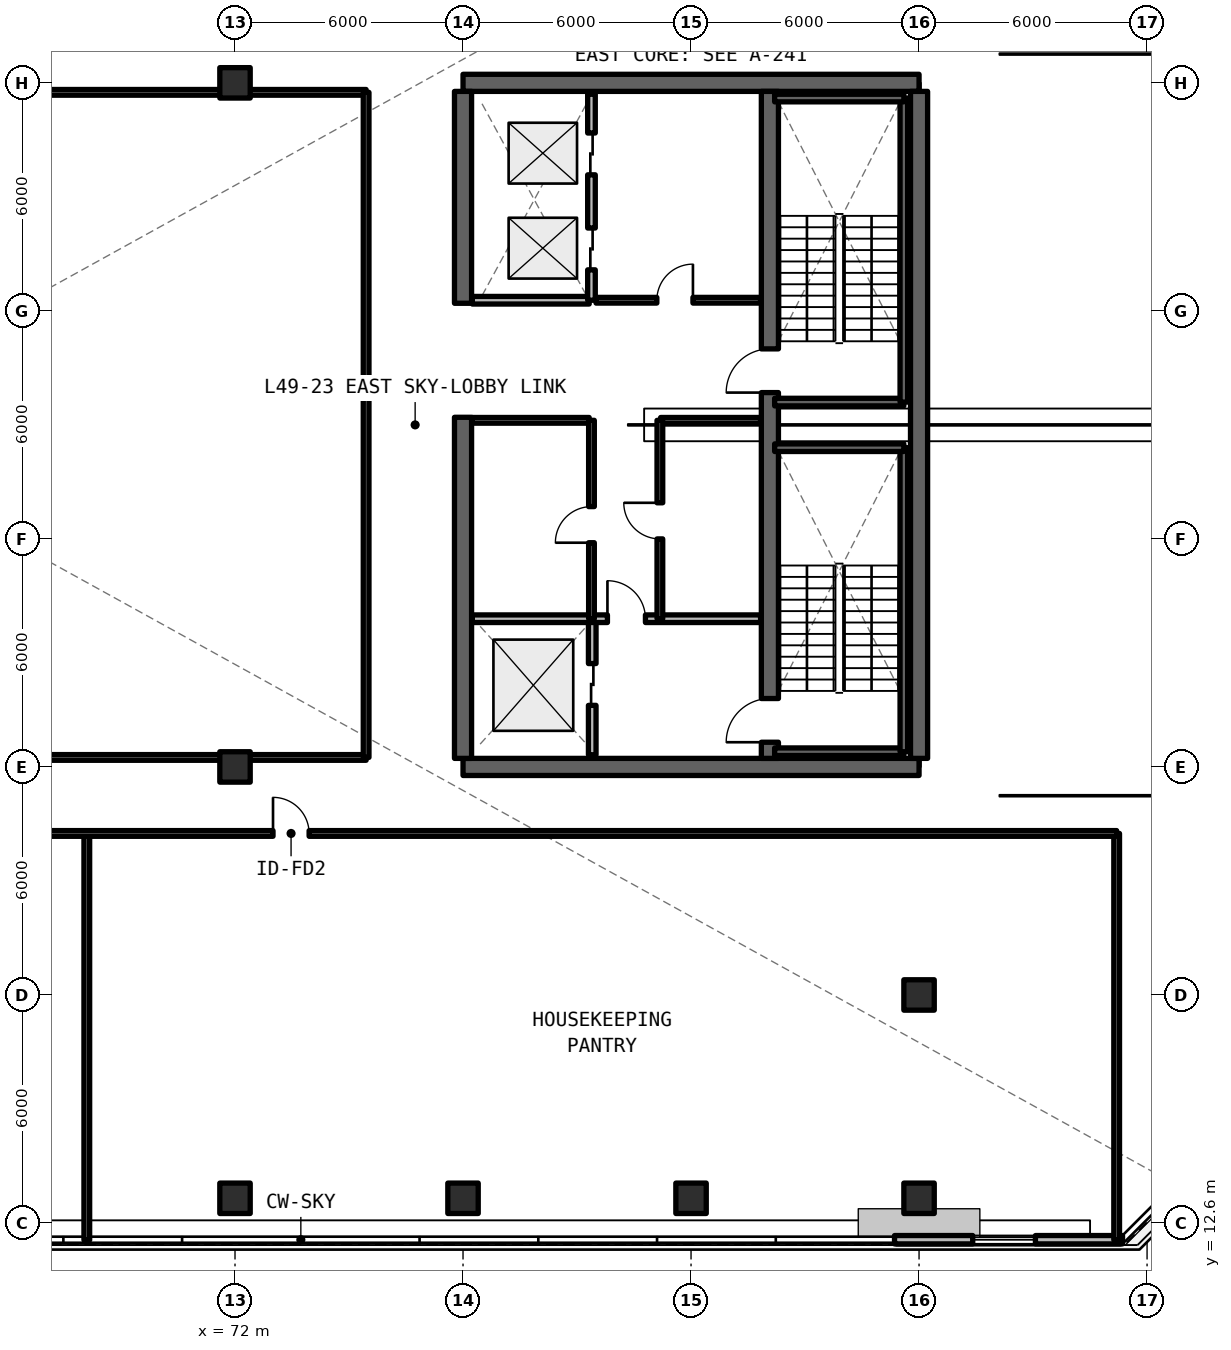
"""IFC4 building model, lengths in metres.
Left out: names, types, materials, properties, quantities, classifications, styles, units other than length and angle.
Written with IfcOpenShell. Run it as: python <this file> out.ifc"""

import sys

from ifc_helpers import new_model, si_unit, direction, frame, frame_2d, origin, origin_2d, place, context, subcontext, project, spatial, rectangle, extrude, element, fill, save


model = new_model("IFC4")
c1 = context("Model", 3, precision=1e-05, world=origin(), true_north=direction((0.0, 1.0)))
c2 = subcontext(c1, "Body", "Model", "MODEL_VIEW")
j1 = project(units=[si_unit("LENGTHUNIT", "METRE"), si_unit("PLANEANGLEUNIT", "RADIAN")], contexts=[c1])
p1 = place(None, origin())
s1 = spatial("IfcSite", under=j1, at=p1, CompositionType="ELEMENT")
p2 = place(p1, origin())
s2 = spatial("IfcBuilding", under=s1, at=p2, CompositionType="ELEMENT")
p3 = place(p2, frame((0.0, 0.0, 177.87)))
s3 = spatial("IfcBuildingStorey", under=s2, at=p3, CompositionType="ELEMENT", Elevation=177.87)
for number, where, z_axis, x_axis in (
    (1, (78.0, 24.6, 0.0), (0.0, 0.0, 1.0), (1.0, 0.0, 0.0)),
    (2, (90.0, 42.6, 0.0), (0.0, 0.0, 1.0), (-1.0, 0.0, 0.0)),
):
    element("IfcWall", number, at=place(p3, frame(where, z_axis=z_axis, x_axis=x_axis)), inside=s3, PredefinedType="SHEAR", context=c2, shape_type="SweptSolid", body=[
        extrude(rectangle(XDim=12.0, YDim=0.45, at=frame_2d((6.0, 0.0))), origin(), (0.0, 0.0, 1.0), 3.96),
    ])
p4 = place(p3, frame((90.0, 24.825, 0.0), z_axis=(0.0, 0.0, 1.0), x_axis=(0.0, 1.0, 0.0)))
e3 = element("IfcWall", 3, at=p4, inside=s3, PredefinedType="SHEAR", context=c2, shape_type="SweptSolid", body=[
    extrude(rectangle(XDim=17.55, YDim=0.45, at=frame_2d((8.775, 0.0))), origin(), (0.0, 0.0, 1.0), 3.96),
])
p5 = place(p3, frame((78.0, 24.825, 0.0), z_axis=(0.0, 0.0, 1.0), x_axis=(0.0, 1.0, 0.0)))
e4 = element("IfcWall", 4, at=p5, inside=s3, PredefinedType="SHEAR", context=c2, shape_type="SweptSolid", body=[
    extrude(rectangle(XDim=8.975, YDim=0.45, at=frame_2d((4.488, 0.0))), origin(), (0.0, 0.0, 1.0), 3.96),
])
p6 = place(p3, frame((78.0, 36.8, 0.0), z_axis=(0.0, 0.0, 1.0), x_axis=(0.0, 1.0, 0.0)))
e5 = element("IfcWall", 5, at=p6, inside=s3, PredefinedType="SHEAR", context=c2, shape_type="SweptSolid", body=[
    extrude(rectangle(XDim=5.575, YDim=0.45, at=frame_2d((2.788, 0.0))), origin(), (0.0, 0.0, 1.0), 3.96),
])
p7 = place(p3, frame((86.075, 24.825, 0.0), z_axis=(0.0, 0.0, 1.0), x_axis=(0.0, 1.0, 0.0)))
e6 = element("IfcWall", 6, at=p7, inside=s3, PredefinedType="SHEAR", context=c2, shape_type="SweptSolid", body=[
    extrude(rectangle(XDim=17.55, YDim=0.45, at=frame_2d((8.775, 0.0))), origin(), (0.0, 0.0, 1.0), 3.96),
])
p8 = place(p7, frame((0.425, 0.0, 0.0)))
e7 = element("IfcOpeningElement", 7, at=p8, cuts=e6, PredefinedType="OPENING", context=c2, shape_type="SweptSolid", body=[
    extrude(rectangle(XDim=1.15, YDim=2.15, at=frame_2d((0.575, 1.075))), frame((0.0, 0.235, 0.0), z_axis=(0.0, -1.0, 0.0), x_axis=(1.0, 0.0, 0.0)), (0.0, 0.0, 1.0), 0.47),
])
p9 = place(p7, frame((9.625, 0.0, 0.0)))
e8 = element("IfcOpeningElement", 8, at=p9, cuts=e6, PredefinedType="OPENING", context=c2, shape_type="SweptSolid", body=[
    extrude(rectangle(XDim=1.15, YDim=2.15, at=frame_2d((0.575, 1.075))), frame((0.0, 0.235, 0.0), z_axis=(0.0, -1.0, 0.0), x_axis=(1.0, 0.0, 0.0)), (0.0, 0.0, 1.0), 0.47),
])
for number, where, z_axis, x_axis in (
    (9, (72.0, 24.6, 0.0), (0.0, 0.0, 1.0), (1.0, 0.0, 0.0)),
    (10, (72.0, 42.6, 0.0), (0.0, 0.0, 1.0), (1.0, 0.0, 0.0)),
    (11, (90.0, 18.6, 0.0), (0.0, 0.0, 1.0), (1.0, 0.0, 0.0)),
):
    element("IfcColumn", number, at=place(p3, frame(where, z_axis=z_axis, x_axis=x_axis)), inside=s3, PredefinedType="COLUMN", context=c2, shape_type="SweptSolid", body=[
        extrude(rectangle(XDim=0.8, YDim=0.8, at=origin_2d()), origin(), (0.0, 0.0, 1.0), 3.96),
    ])
for number, where, z_axis, x_axis in (
    (12, (72.0, 13.25, -0.28), (0.0, 0.0, 1.0), (1.0, 0.0, 0.0)),
    (13, (78.0, 13.25, -0.28), (0.0, 0.0, 1.0), (1.0, 0.0, 0.0)),
    (14, (84.0, 13.25, -0.28), (0.0, 0.0, 1.0), (1.0, 0.0, 0.0)),
    (15, (90.0, 13.25, -0.28), (0.0, 0.0, 1.0), (1.0, 0.0, 0.0)),
):
    element("IfcColumn", number, at=place(p3, frame(where, z_axis=z_axis, x_axis=x_axis)), inside=s3, PredefinedType="COLUMN", context=c2, shape_type="SweptSolid", body=[
        extrude(rectangle(XDim=0.8, YDim=0.8, at=origin_2d()), origin(), (0.0, 0.0, 1.0), 4.24),
    ])
p10 = place(p3, frame((89.354, 12.16, 0.0), z_axis=(0.0, 0.0, 1.0), x_axis=(1.0, 0.0, 0.0)))
e16 = element("IfcWall", 16, at=p10, inside=s3, PredefinedType="SOLIDWALL", context=c2, shape_type="SweptSolid", body=[
    extrude(rectangle(XDim=6.0, YDim=0.22, at=frame_2d((3.0, 0.0))), origin(), (0.0, 0.0, 1.0), 3.74),
])
p11 = place(p10, frame((2.058, 0.0, 0.78)))
e17 = element("IfcOpeningElement", 17, at=p11, cuts=e16, PredefinedType="OPENING", context=c2, shape_type="SweptSolid", body=[
    extrude(rectangle(XDim=1.65, YDim=1.66, at=frame_2d((0.825, 0.83))), frame((0.0, 0.12, 0.0), z_axis=(0.0, -1.0, 0.0), x_axis=(1.0, 0.0, 0.0)), (0.0, 0.0, 1.0), 0.24),
])
p12 = place(p3, frame((81.4, 24.92, 0.0), z_axis=(0.0, 0.0, 1.0), x_axis=(0.0, 1.0, 0.0)))
e18 = element("IfcWall", 18, at=p12, inside=s3, PredefinedType="SOLIDWALL", context=c2, shape_type="SweptSolid", body=[
    extrude(rectangle(XDim=3.58, YDim=0.2, at=frame_2d((1.79, 0.0))), origin(), (0.0, 0.0, 1.0), 2.96),
])
p13 = place(p12, frame((1.3, 0.0, 0.0)))
e19 = element("IfcOpeningElement", 19, at=p13, cuts=e18, PredefinedType="OPENING", context=c2, shape_type="SweptSolid", body=[
    extrude(rectangle(XDim=1.1, YDim=2.2, at=frame_2d((0.55, 1.1))), frame((0.0, 0.11, 0.0), z_axis=(0.0, -1.0, 0.0), x_axis=(1.0, 0.0, 0.0)), (0.0, 0.0, 1.0), 0.22),
])
p14 = place(p3, frame((78.245, 28.5, 0.0), z_axis=(0.0, 0.0, 1.0), x_axis=(1.0, 0.0, 0.0)))
e20 = element("IfcWall", 20, at=p14, inside=s3, PredefinedType="SOLIDWALL", context=c2, shape_type="SweptSolid", body=[
    extrude(rectangle(XDim=7.585, YDim=0.2, at=frame_2d((3.792, 0.0))), origin(), (0.0, 0.0, 1.0), 2.96),
])
p15 = place(p14, frame((3.555, 0.0, 0.0)))
e21 = element("IfcOpeningElement", 21, at=p15, cuts=e20, PredefinedType="OPENING", context=c2, shape_type="SweptSolid", body=[
    extrude(rectangle(XDim=1.0, YDim=2.15, at=frame_2d((0.5, 1.075))), frame((0.0, 0.11, 0.0), z_axis=(0.0, -1.0, 0.0), x_axis=(1.0, 0.0, 0.0)), (0.0, 0.0, 1.0), 0.22),
])
p16 = place(p3, frame((83.2, 33.72, 0.0), z_axis=(0.0, 0.0, 1.0), x_axis=(1.0, 0.0, 0.0)))
e22 = element("IfcWall", 22, at=p16, inside=s3, PredefinedType="SOLIDWALL", context=c2, shape_type="SweptSolid", body=[
    extrude(rectangle(XDim=2.63, YDim=0.15, at=frame_2d((1.315, 0.0))), origin(), (0.0, 0.0, 1.0), 2.96),
])
p17 = place(p3, frame((83.18, 28.5, 0.0), z_axis=(0.0, 0.0, 1.0), x_axis=(0.0, 1.0, 0.0)))
e23 = element("IfcWall", 23, at=p17, inside=s3, PredefinedType="SOLIDWALL", context=c2, shape_type="SweptSolid", body=[
    extrude(rectangle(XDim=5.22, YDim=0.15, at=frame_2d((2.61, 0.0))), origin(), (0.0, 0.0, 1.0), 2.96),
])
p18 = place(p17, frame((2.1, 0.0, 0.0)))
e24 = element("IfcOpeningElement", 24, at=p18, cuts=e23, PredefinedType="OPENING", context=c2, shape_type="SweptSolid", body=[
    extrude(rectangle(XDim=0.95, YDim=2.15, at=frame_2d((0.475, 1.075))), frame((0.0, 0.085, 0.0), z_axis=(0.0, -1.0, 0.0), x_axis=(1.0, 0.0, 0.0)), (0.0, 0.0, 1.0), 0.17),
])
p19 = place(p3, frame((78.245, 33.72, 0.0), z_axis=(0.0, 0.0, 1.0), x_axis=(1.0, 0.0, 0.0)))
e25 = element("IfcWall", 25, at=p19, inside=s3, PredefinedType="SOLIDWALL", context=c2, shape_type="SweptSolid", body=[
    extrude(rectangle(XDim=3.075, YDim=0.15, at=frame_2d((1.538, 0.0))), origin(), (0.0, 0.0, 1.0), 2.96),
])
p20 = place(p3, frame((81.38, 28.5, 0.0), z_axis=(0.0, 0.0, 1.0), x_axis=(0.0, 1.0, 0.0)))
e26 = element("IfcWall", 26, at=p20, inside=s3, PredefinedType="SOLIDWALL", context=c2, shape_type="SweptSolid", body=[
    extrude(rectangle(XDim=5.22, YDim=0.15, at=frame_2d((2.61, 0.0))), origin(), (0.0, 0.0, 1.0), 2.96),
])
p21 = place(p20, frame((2.0, 0.0, 0.0)))
e27 = element("IfcOpeningElement", 27, at=p21, cuts=e26, PredefinedType="OPENING", context=c2, shape_type="SweptSolid", body=[
    extrude(rectangle(XDim=0.95, YDim=2.15, at=frame_2d((0.475, 1.075))), frame((0.0, 0.085, 0.0), z_axis=(0.0, -1.0, 0.0), x_axis=(1.0, 0.0, 0.0)), (0.0, 0.0, 1.0), 0.17),
])
p22 = place(p3, frame((81.5, 36.88, 0.0), z_axis=(0.0, 0.0, 1.0), x_axis=(1.0, 0.0, 0.0)))
e28 = element("IfcWall", 28, at=p22, inside=s3, PredefinedType="SOLIDWALL", context=c2, shape_type="SweptSolid", body=[
    extrude(rectangle(XDim=4.33, YDim=0.15, at=frame_2d((2.165, 0.0))), origin(), (0.0, 0.0, 1.0), 2.96),
])
p23 = place(p22, frame((1.6, 0.0, 0.0)))
e29 = element("IfcOpeningElement", 29, at=p23, cuts=e28, PredefinedType="OPENING", context=c2, shape_type="SweptSolid", body=[
    extrude(rectangle(XDim=0.95, YDim=2.15, at=frame_2d((0.475, 1.075))), frame((0.0, 0.085, 0.0), z_axis=(0.0, -1.0, 0.0), x_axis=(1.0, 0.0, 0.0)), (0.0, 0.0, 1.0), 0.17),
])
p24 = place(p3, frame((78.245, 36.88, 0.0), z_axis=(0.0, 0.0, 1.0), x_axis=(1.0, 0.0, 0.0)))
e30 = element("IfcWall", 30, at=p24, inside=s3, PredefinedType="SOLIDWALL", context=c2, shape_type="SweptSolid", body=[
    extrude(rectangle(XDim=3.075, YDim=0.2, at=frame_2d((1.538, 0.0))), origin(), (0.0, 0.0, 1.0), 2.96),
])
p25 = place(p3, frame((81.38, 36.88, 0.0), z_axis=(0.0, 0.0, 1.0), x_axis=(0.0, 1.0, 0.0)))
e31 = element("IfcWall", 31, at=p25, inside=s3, PredefinedType="SOLIDWALL", context=c2, shape_type="SweptSolid", body=[
    extrude(rectangle(XDim=5.42, YDim=0.2, at=frame_2d((2.71, 0.0))), origin(), (0.0, 0.0, 1.0), 2.96),
])
p26 = place(p25, frame((0.8, 0.0, 0.0)))
e32 = element("IfcOpeningElement", 32, at=p26, cuts=e31, PredefinedType="OPENING", context=c2, shape_type="SweptSolid", body=[
    extrude(rectangle(XDim=1.1, YDim=2.2, at=frame_2d((0.55, 1.1))), frame((0.0, 0.11, 0.0), z_axis=(0.0, -1.0, 0.0), x_axis=(1.0, 0.0, 0.0)), (0.0, 0.0, 1.0), 0.22),
])
p27 = place(p25, frame((3.3, 0.0, 0.0)))
e33 = element("IfcOpeningElement", 33, at=p27, cuts=e31, PredefinedType="OPENING", context=c2, shape_type="SweptSolid", body=[
    extrude(rectangle(XDim=1.1, YDim=2.2, at=frame_2d((0.55, 1.1))), frame((0.0, 0.11, 0.0), z_axis=(0.0, -1.0, 0.0), x_axis=(1.0, 0.0, 0.0)), (0.0, 0.0, 1.0), 0.22),
])
for number, where, z_axis, x_axis in (
    (34, (38.55, 24.85, 0.0), (0.0, 0.0, 1.0), (1.0, 0.0, 0.0)),
    (35, (38.55, 42.35, 0.0), (0.0, 0.0, 1.0), (1.0, 0.0, 0.0)),
):
    element("IfcWall", number, at=place(p3, frame(where, z_axis=z_axis, x_axis=x_axis)), inside=s3, PredefinedType="SOLIDWALL", context=c2, shape_type="SweptSolid", body=[
        extrude(rectangle(XDim=36.9, YDim=0.15, at=frame_2d((18.45, 0.0))), origin(), (0.0, 0.0, 1.0), 2.96),
    ])
p28 = place(p3, frame((75.45, 24.85, 0.0), z_axis=(0.0, 0.0, 1.0), x_axis=(0.0, 1.0, 0.0)))
e36 = element("IfcWall", 36, at=p28, inside=s3, PredefinedType="SOLIDWALL", context=c2, shape_type="SweptSolid", body=[
    extrude(rectangle(XDim=17.5, YDim=0.15, at=frame_2d((8.75, 0.0))), origin(), (0.0, 0.0, 1.0), 2.96),
])
p29 = place(p3, frame((68.1, 12.15, 0.0), z_axis=(0.0, 0.0, 1.0), x_axis=(0.0, 1.0, 0.0)))
e37 = element("IfcWall", 37, at=p29, inside=s3, PredefinedType="PARTITIONING", context=c2, shape_type="SweptSolid", body=[
    extrude(rectangle(XDim=10.7, YDim=0.15, at=frame_2d((5.35, 0.0))), origin(), (0.0, 0.0, 1.0), 2.96),
])
p30 = place(p3, frame((95.2, 12.15, 0.0), z_axis=(0.0, 0.0, 1.0), x_axis=(0.0, 1.0, 0.0)))
e38 = element("IfcWall", 38, at=p30, inside=s3, PredefinedType="SOLIDWALL", context=c2, shape_type="SweptSolid", body=[
    extrude(rectangle(XDim=10.7, YDim=0.15, at=frame_2d((5.35, 0.0))), origin(), (0.0, 0.0, 1.0), 2.96),
])
p31 = place(p3, frame((26.0, 22.85, 0.0), z_axis=(0.0, 0.0, 1.0), x_axis=(1.0, 0.0, 0.0)))
e39 = element("IfcWall", 39, at=p31, inside=s3, PredefinedType="SOLIDWALL", context=c2, shape_type="SweptSolid", body=[
    extrude(rectangle(XDim=69.2, YDim=0.15, at=frame_2d((34.6, 0.0))), origin(), (0.0, 0.0, 1.0), 2.96),
])
p32 = place(p31, frame((6.0, 0.0, 0.0)))
e40 = element("IfcOpeningElement", 40, at=p32, cuts=e39, PredefinedType="OPENING", context=c2, shape_type="SweptSolid", body=[
    extrude(rectangle(XDim=1.4, YDim=2.15, at=frame_2d((0.7, 1.075))), frame((0.0, 0.085, 0.0), z_axis=(0.0, -1.0, 0.0), x_axis=(1.0, 0.0, 0.0)), (0.0, 0.0, 1.0), 0.17),
])
p33 = place(p31, frame((20.15, 0.0, 0.0)))
e41 = element("IfcOpeningElement", 41, at=p33, cuts=e39, PredefinedType="OPENING", context=c2, shape_type="SweptSolid", body=[
    extrude(rectangle(XDim=1.1, YDim=2.15, at=frame_2d((0.55, 1.075))), frame((0.0, 0.085, 0.0), z_axis=(0.0, -1.0, 0.0), x_axis=(1.0, 0.0, 0.0)), (0.0, 0.0, 1.0), 0.17),
])
p34 = place(p31, frame((30.5, 0.0, 0.0)))
e42 = element("IfcOpeningElement", 42, at=p34, cuts=e39, PredefinedType="OPENING", context=c2, shape_type="SweptSolid", body=[
    extrude(rectangle(XDim=1.4, YDim=2.15, at=frame_2d((0.7, 1.075))), frame((0.0, 0.085, 0.0), z_axis=(0.0, -1.0, 0.0), x_axis=(1.0, 0.0, 0.0)), (0.0, 0.0, 1.0), 0.17),
])
p35 = place(p31, frame((47.0, 0.0, 0.0)))
e43 = element("IfcOpeningElement", 43, at=p35, cuts=e39, PredefinedType="OPENING", context=c2, shape_type="SweptSolid", body=[
    extrude(rectangle(XDim=0.95, YDim=2.15, at=frame_2d((0.475, 1.075))), frame((0.0, 0.085, 0.0), z_axis=(0.0, -1.0, 0.0), x_axis=(1.0, 0.0, 0.0)), (0.0, 0.0, 1.0), 0.17),
])
p36 = place(p3, frame((86.2, 25.0, 0.0), z_axis=(0.0, 0.0, 1.0), x_axis=(1.0, 0.0, 0.0)))
e44 = element("IfcWall", 44, at=p36, inside=s3, PredefinedType="SOLIDWALL", context=c2, shape_type="SweptSolid", body=[
    extrude(rectangle(XDim=3.4, YDim=0.2, at=frame_2d((1.7, 0.0))), origin(), (0.0, 0.0, 1.0), 3.96),
])
p37 = place(p3, frame((89.6, 25.0, 0.0), z_axis=(0.0, 0.0, 1.0), x_axis=(0.0, 1.0, 0.0)))
e45 = element("IfcWall", 45, at=p37, inside=s3, PredefinedType="SOLIDWALL", context=c2, shape_type="SweptSolid", body=[
    extrude(rectangle(XDim=8.0, YDim=0.2, at=frame_2d((4.0, 0.0))), origin(), (0.0, 0.0, 1.0), 3.96),
])
for number, where, z_axis, x_axis in (
    (46, (89.6, 33.0, 0.0), (0.0, 0.0, 1.0), (-1.0, 0.0, 0.0)),
    (47, (86.2, 34.2, 0.0), (0.0, 0.0, 1.0), (1.0, 0.0, 0.0)),
):
    element("IfcWall", number, at=place(p3, frame(where, z_axis=z_axis, x_axis=x_axis)), inside=s3, PredefinedType="SOLIDWALL", context=c2, shape_type="SweptSolid", body=[
        extrude(rectangle(XDim=3.4, YDim=0.2, at=frame_2d((1.7, 0.0))), origin(), (0.0, 0.0, 1.0), 3.96),
    ])
p38 = place(p3, frame((89.6, 34.2, 0.0), z_axis=(0.0, 0.0, 1.0), x_axis=(0.0, 1.0, 0.0)))
e48 = element("IfcWall", 48, at=p38, inside=s3, PredefinedType="SOLIDWALL", context=c2, shape_type="SweptSolid", body=[
    extrude(rectangle(XDim=8.0, YDim=0.2, at=frame_2d((4.0, 0.0))), origin(), (0.0, 0.0, 1.0), 3.96),
])
p39 = place(p3, frame((89.6, 42.2, 0.0), z_axis=(0.0, 0.0, 1.0), x_axis=(-1.0, 0.0, 0.0)))
e49 = element("IfcWall", 49, at=p39, inside=s3, PredefinedType="SOLIDWALL", context=c2, shape_type="SweptSolid", body=[
    extrude(rectangle(XDim=3.4, YDim=0.2, at=frame_2d((1.7, 0.0))), origin(), (0.0, 0.0, 1.0), 3.96),
])
p40 = place(p11, origin())
e50 = element("IfcWindow", 50, at=p40, inside=s3, PartitioningType="SINGLE_PANEL", PredefinedType="WINDOW", context=c2, shape_type="SweptSolid", body=[
    extrude(rectangle(XDim=1.65, YDim=1.66, at=frame_2d((0.825, 0.83))), frame((0.0, 0.03, 0.0), z_axis=(0.0, -1.0, 0.0), x_axis=(1.0, 0.0, 0.0)), (0.0, 0.0, 1.0), 0.06),
])
fill(e17, e50)
p41 = place(p13, origin())
e51 = element("IfcDoor", 51, at=p41, inside=s3, OperationType="SLIDING_TO_LEFT", PredefinedType="DOOR", context=c2, shape_type="SweptSolid", body=[
    extrude(rectangle(XDim=1.1, YDim=2.2, at=frame_2d((0.55, 1.1))), frame((0.0, 0.025, 0.0), z_axis=(0.0, -1.0, 0.0), x_axis=(1.0, 0.0, 0.0)), (0.0, 0.0, 1.0), 0.05),
])
fill(e19, e51)
p42 = place(p15, origin())
e52 = element("IfcDoor", 52, at=p42, inside=s3, OperationType="SINGLE_SWING_LEFT", PredefinedType="DOOR", context=c2, shape_type="SweptSolid", body=[
    extrude(rectangle(XDim=1.0, YDim=2.15, at=frame_2d((0.5, 1.075))), frame((0.0, 0.025, 0.0), z_axis=(0.0, -1.0, 0.0), x_axis=(1.0, 0.0, 0.0)), (0.0, 0.0, 1.0), 0.05),
])
fill(e21, e52)
p43 = place(p18, origin())
e53 = element("IfcDoor", 53, at=p43, inside=s3, OperationType="SINGLE_SWING_RIGHT", PredefinedType="DOOR", context=c2, shape_type="SweptSolid", body=[
    extrude(rectangle(XDim=0.95, YDim=2.15, at=frame_2d((0.475, 1.075))), frame((0.0, 0.025, 0.0), z_axis=(0.0, -1.0, 0.0), x_axis=(1.0, 0.0, 0.0)), (0.0, 0.0, 1.0), 0.05),
])
fill(e24, e53)
p44 = place(p21, origin())
e54 = element("IfcDoor", 54, at=p44, inside=s3, OperationType="SINGLE_SWING_LEFT", PredefinedType="DOOR", context=c2, shape_type="SweptSolid", body=[
    extrude(rectangle(XDim=0.95, YDim=2.15, at=frame_2d((0.475, 1.075))), frame((0.0, 0.025, 0.0), z_axis=(0.0, -1.0, 0.0), x_axis=(1.0, 0.0, 0.0)), (0.0, 0.0, 1.0), 0.05),
])
fill(e27, e54)
p45 = place(p23, origin())
e55 = element("IfcDoor", 55, at=p45, inside=s3, OperationType="SINGLE_SWING_RIGHT", PredefinedType="DOOR", context=c2, shape_type="SweptSolid", body=[
    extrude(rectangle(XDim=0.95, YDim=2.15, at=frame_2d((0.475, 1.075))), frame((0.0, 0.025, 0.0), z_axis=(0.0, -1.0, 0.0), x_axis=(1.0, 0.0, 0.0)), (0.0, 0.0, 1.0), 0.05),
])
fill(e29, e55)
p46 = place(p26, origin())
e56 = element("IfcDoor", 56, at=p46, inside=s3, OperationType="SLIDING_TO_LEFT", PredefinedType="DOOR", context=c2, shape_type="SweptSolid", body=[
    extrude(rectangle(XDim=1.1, YDim=2.2, at=frame_2d((0.55, 1.1))), frame((0.0, 0.025, 0.0), z_axis=(0.0, -1.0, 0.0), x_axis=(1.0, 0.0, 0.0)), (0.0, 0.0, 1.0), 0.05),
])
fill(e32, e56)
p47 = place(p27, origin())
e57 = element("IfcDoor", 57, at=p47, inside=s3, OperationType="SLIDING_TO_RIGHT", PredefinedType="DOOR", context=c2, shape_type="SweptSolid", body=[
    extrude(rectangle(XDim=1.1, YDim=2.2, at=frame_2d((0.55, 1.1))), frame((0.0, 0.025, 0.0), z_axis=(0.0, -1.0, 0.0), x_axis=(1.0, 0.0, 0.0)), (0.0, 0.0, 1.0), 0.05),
])
fill(e33, e57)
p48 = place(p35, origin())
e58 = element("IfcDoor", 58, at=p48, inside=s3, OperationType="SINGLE_SWING_LEFT", PredefinedType="DOOR", context=c2, shape_type="SweptSolid", body=[
    extrude(rectangle(XDim=0.95, YDim=2.15, at=frame_2d((0.475, 1.075))), frame((0.0, 0.025, 0.0), z_axis=(0.0, -1.0, 0.0), x_axis=(1.0, 0.0, 0.0)), (0.0, 0.0, 1.0), 0.05),
])
fill(e43, e58)
p49 = place(p8, origin())
e59 = element("IfcDoor", 59, at=p49, inside=s3, OperationType="SINGLE_SWING_LEFT", PredefinedType="DOOR", context=c2, shape_type="SweptSolid", body=[
    extrude(rectangle(XDim=1.15, YDim=2.15, at=frame_2d((0.575, 1.075))), frame((0.0, 0.025, 0.0), z_axis=(0.0, -1.0, 0.0), x_axis=(1.0, 0.0, 0.0)), (0.0, 0.0, 1.0), 0.05),
])
fill(e7, e59)
p50 = place(p9, origin())
e60 = element("IfcDoor", 60, at=p50, inside=s3, OperationType="SINGLE_SWING_RIGHT", PredefinedType="DOOR", context=c2, shape_type="SweptSolid", body=[
    extrude(rectangle(XDim=1.15, YDim=2.15, at=frame_2d((0.575, 1.075))), frame((0.0, 0.025, 0.0), z_axis=(0.0, -1.0, 0.0), x_axis=(1.0, 0.0, 0.0)), (0.0, 0.0, 1.0), 0.05),
])
fill(e8, e60)
save(model, sys.argv[1])
